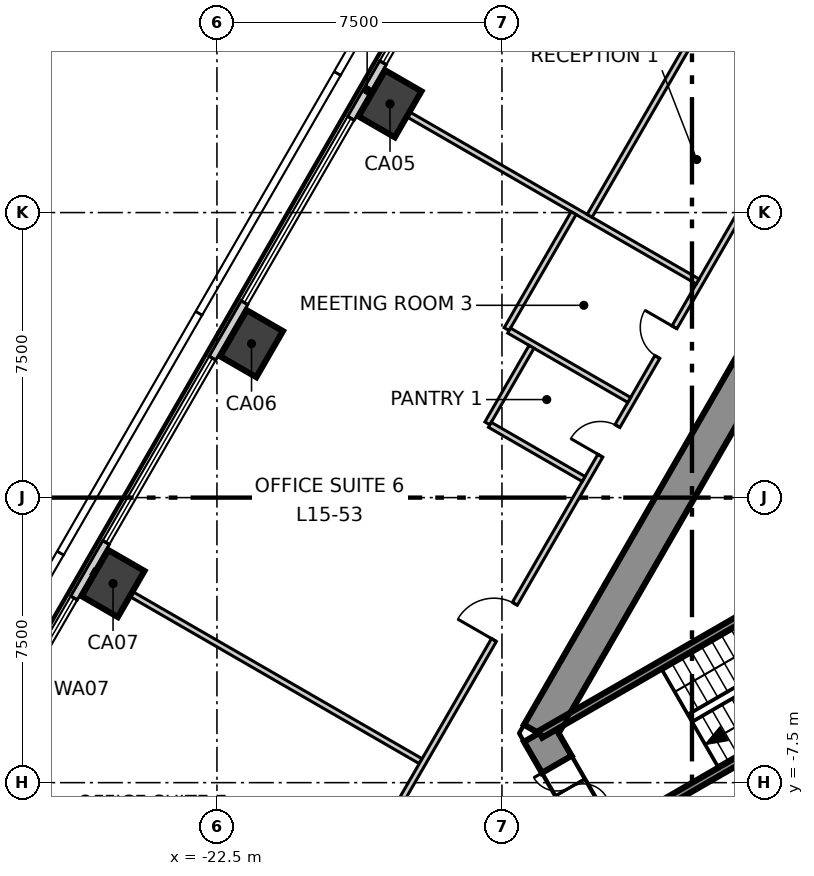
"""IFC4 building model, lengths in metres.
Left out: names, types, materials, properties, quantities, classifications, styles, units other than length and angle.
Written with IfcOpenShell. Run it as: python <this file> out.ifc"""

import sys

from ifc_helpers import new_model, si_unit, direction, frame, frame_2d, origin, origin_2d, place, context, subcontext, project, spatial, polyline, rectangle, outline, extrude, element, fill, save


model = new_model("IFC4")
c1 = context("Model", 3, precision=1e-05, world=origin(), true_north=direction((0.0, 1.0)))
c2 = subcontext(c1, "Body", "Model", "MODEL_VIEW")
j1 = project(units=[si_unit("LENGTHUNIT", "METRE"), si_unit("PLANEANGLEUNIT", "RADIAN")], contexts=[c1])
p1 = place(None, origin())
s1 = spatial("IfcSite", under=j1, at=p1, CompositionType="ELEMENT")
p2 = place(p1, origin())
s2 = spatial("IfcBuilding", under=s1, at=p2, CompositionType="ELEMENT")
p3 = place(p2, frame((0.0, 0.0, 71.3)))
s3 = spatial("IfcBuildingStorey", under=s2, at=p3, CompositionType="ELEMENT", Elevation=71.3)
p4 = place(p3, frame((-1.645, 15.25, -0.3), z_axis=(0.0, 0.0, 1.0), x_axis=(-0.500026485275, -0.866010111964, 0.0)))
e1 = element("IfcWall", 1, at=p4, inside=s3, PredefinedType="SHEAR", context=c2, shape_type="SweptSolid", body=[
    extrude(outline(polyline([(-0.26, -0.45), (1.685, -0.45), (3.63, -0.45), (5.576, -0.45), (7.521, -0.45), (9.466, -0.449), (11.411, -0.449), (13.357, -0.449), (15.302, -0.449), (17.247, -0.449), (19.192, -0.449), (21.138, -0.449), (23.083, -0.449), (25.028, -0.449), (24.509, 0.45), (22.644, 0.45), (20.778, 0.45), (18.913, 0.45), (17.048, 0.45), (15.182, 0.449), (13.317, 0.449), (11.452, 0.449), (9.587, 0.449), (7.721, 0.449), (5.856, 0.449), (3.991, 0.449), (2.125, 0.449), (0.26, 0.449), (-0.26, -0.45)])), origin(), (0.0, 0.0, 1.0), 4.0),
])
p5 = place(p4, frame((11.834, 0.0, 0.3)))
e2 = element("IfcOpeningElement", 2, at=p5, cuts=e1, PredefinedType="OPENING", context=c2, shape_type="SweptSolid", body=[
    extrude(rectangle(XDim=1.1, YDim=2.1, at=frame_2d((0.55, 1.05))), frame((0.0, 0.46, 0.0), z_axis=(0.0, -1.0, 0.0), x_axis=(1.0, 0.0, 0.0)), (0.0, 0.0, 1.0), 0.92),
])
p6 = place(p4, frame((8.13, 0.0, 0.3)))
e3 = element("IfcOpeningElement", 3, at=p6, cuts=e1, PredefinedType="OPENING", context=c2, shape_type="SweptSolid", body=[
    extrude(rectangle(XDim=0.9, YDim=2.1, at=frame_2d((0.45, 1.05))), frame((0.0, 0.46, 0.0), z_axis=(0.0, -1.0, 0.0), x_axis=(1.0, 0.0, 0.0)), (0.0, 0.0, 1.0), 0.92),
])
p7 = place(p4, frame((3.255, 0.0, 0.3)))
e4 = element("IfcOpeningElement", 4, at=p7, cuts=e1, PredefinedType="OPENING", context=c2, shape_type="SweptSolid", body=[
    extrude(rectangle(XDim=0.9, YDim=2.1, at=frame_2d((0.45, 1.05))), frame((0.0, 0.46, 0.0), z_axis=(0.0, -1.0, 0.0), x_axis=(1.0, 0.0, 0.0)), (0.0, 0.0, 1.0), 0.92),
])
p8 = place(p3, frame((-14.03, -6.2, -0.3), z_axis=(0.0, 0.0, 1.0), x_axis=(0.500111984565, -0.865960739811, 0.0)))
e5 = element("IfcWall", 5, at=p8, inside=s3, PredefinedType="SHEAR", context=c2, shape_type="SweptSolid", body=[
    extrude(outline(polyline([(-0.26, -0.449), (1.646, -0.449), (3.551, -0.45), (3.032, 0.45), (1.646, 0.45), (0.26, 0.45), (-0.26, -0.449)])), origin(), (0.0, 0.0, 1.0), 4.0),
])
p9 = place(p8, frame((0.946, 0.0, 0.3)))
e6 = element("IfcOpeningElement", 6, at=p9, cuts=e5, PredefinedType="OPENING", context=c2, shape_type="SweptSolid", body=[
    extrude(rectangle(XDim=1.4, YDim=2.1, at=frame_2d((0.7, 1.05))), frame((0.0, 0.46, 0.0), z_axis=(0.0, -1.0, 0.0), x_axis=(1.0, 0.0, 0.0)), (0.0, 0.0, 1.0), 0.92),
])
for number, where, z_axis, x_axis in (
    (7, (-17.946, 10.361, -0.3), (0.0, 0.0, 1.0), (0.5, 0.866, 0.0)),
    (8, (-21.59, 4.05, -0.3), (0.0, 0.0, 1.0), (0.5, 0.866, 0.0)),
    (9, (-25.234, -2.261, -0.3), (0.0, 0.0, 1.0), (0.5, 0.866, 0.0)),
):
    element("IfcColumn", number, at=place(p3, frame(where, z_axis=z_axis, x_axis=x_axis)), inside=s3, PredefinedType="COLUMN", context=c2, shape_type="SweptSolid", body=[
        extrude(rectangle(XDim=1.4, YDim=1.1, at=origin_2d()), origin(), (0.0, 0.0, 1.0), 4.0),
    ])
p10 = place(p3, frame((-3.326, 37.084, 0.0), z_axis=(0.0, 0.0, 1.0), x_axis=(-0.500000131003, -0.86602532815, 0.0)))
e10 = element("IfcWall", 10, at=p10, inside=s3, PredefinedType="ELEMENTEDWALL", context=c2, shape_type="SweptSolid", body=[
    extrude(rectangle(XDim=60.886, YDim=0.2, at=frame_2d((30.443, 0.0))), origin(), (0.0, 0.0, 1.0), 3.7),
])
p11 = place(p10, frame((2.146, 0.0, 0.9)))
e11 = element("IfcOpeningElement", 11, at=p11, cuts=e10, PredefinedType="OPENING", context=c2, shape_type="SweptSolid", body=[
    extrude(rectangle(XDim=5.6, YDim=2.5, at=frame_2d((2.8, 1.25))), frame((0.0, 0.11, 0.0), z_axis=(0.0, -1.0, 0.0), x_axis=(1.0, 0.0, 0.0)), (0.0, 0.0, 1.0), 0.22),
])
p12 = place(p10, frame((9.434, 0.0, 0.9)))
e12 = element("IfcOpeningElement", 12, at=p12, cuts=e10, PredefinedType="OPENING", context=c2, shape_type="SweptSolid", body=[
    extrude(rectangle(XDim=5.6, YDim=2.5, at=frame_2d((2.8, 1.25))), frame((0.0, 0.11, 0.0), z_axis=(0.0, -1.0, 0.0), x_axis=(1.0, 0.0, 0.0)), (0.0, 0.0, 1.0), 0.22),
])
p13 = place(p10, frame((16.721, 0.0, 0.9)))
e13 = element("IfcOpeningElement", 13, at=p13, cuts=e10, PredefinedType="OPENING", context=c2, shape_type="SweptSolid", body=[
    extrude(rectangle(XDim=5.6, YDim=2.5, at=frame_2d((2.8, 1.25))), frame((0.0, 0.11, 0.0), z_axis=(0.0, -1.0, 0.0), x_axis=(1.0, 0.0, 0.0)), (0.0, 0.0, 1.0), 0.22),
])
p14 = place(p10, frame((24.009, 0.0, 0.9)))
e14 = element("IfcOpeningElement", 14, at=p14, cuts=e10, PredefinedType="OPENING", context=c2, shape_type="SweptSolid", body=[
    extrude(rectangle(XDim=5.6, YDim=2.5, at=frame_2d((2.8, 1.25))), frame((0.0, 0.11, 0.0), z_axis=(0.0, -1.0, 0.0), x_axis=(1.0, 0.0, 0.0)), (0.0, 0.0, 1.0), 0.22),
])
p15 = place(p10, frame((31.297, 0.0, 0.9)))
e15 = element("IfcOpeningElement", 15, at=p15, cuts=e10, PredefinedType="OPENING", context=c2, shape_type="SweptSolid", body=[
    extrude(rectangle(XDim=5.6, YDim=2.5, at=frame_2d((2.8, 1.25))), frame((0.0, 0.11, 0.0), z_axis=(0.0, -1.0, 0.0), x_axis=(1.0, 0.0, 0.0)), (0.0, 0.0, 1.0), 0.22),
])
p16 = place(p10, frame((38.584, 0.0, 0.9)))
e16 = element("IfcOpeningElement", 16, at=p16, cuts=e10, PredefinedType="OPENING", context=c2, shape_type="SweptSolid", body=[
    extrude(rectangle(XDim=5.6, YDim=2.5, at=frame_2d((2.8, 1.25))), frame((0.0, 0.11, 0.0), z_axis=(0.0, -1.0, 0.0), x_axis=(1.0, 0.0, 0.0)), (0.0, 0.0, 1.0), 0.22),
])
p17 = place(p10, frame((45.872, 0.0, 0.9)))
e17 = element("IfcOpeningElement", 17, at=p17, cuts=e10, PredefinedType="OPENING", context=c2, shape_type="SweptSolid", body=[
    extrude(rectangle(XDim=5.6, YDim=2.5, at=frame_2d((2.8, 1.25))), frame((0.0, 0.11, 0.0), z_axis=(0.0, -1.0, 0.0), x_axis=(1.0, 0.0, 0.0)), (0.0, 0.0, 1.0), 0.22),
])
p18 = place(p10, frame((53.159, 0.0, 0.9)))
e18 = element("IfcOpeningElement", 18, at=p18, cuts=e10, PredefinedType="OPENING", context=c2, shape_type="SweptSolid", body=[
    extrude(rectangle(XDim=5.6, YDim=2.5, at=frame_2d((2.8, 1.25))), frame((0.0, 0.11, 0.0), z_axis=(0.0, -1.0, 0.0), x_axis=(1.0, 0.0, 0.0)), (0.0, 0.0, 1.0), 0.22),
])
p19 = place(p3, frame((-25.771, -1.951, 0.0), z_axis=(0.0, 0.0, 1.0), x_axis=(0.866008152443, -0.500029879009, 0.0)))
e19 = element("IfcWall", 19, at=p19, inside=s3, PredefinedType="PARTITIONING", context=c2, shape_type="SweptSolid", body=[
    extrude(rectangle(XDim=9.968, YDim=0.15, at=frame_2d((4.984, 0.0))), origin(), (0.0, 0.0, 1.0), 3.7),
])
p20 = place(p3, frame((-19.497, -11.17, 0.0), z_axis=(0.0, 0.0, 1.0), x_axis=(0.499998854553, 0.866026065108, 0.0)))
e20 = element("IfcWall", 20, at=p20, inside=s3, PredefinedType="PARTITIONING", context=c2, shape_type="SweptSolid", body=[
    extrude(rectangle(XDim=38.994, YDim=0.15, at=frame_2d((19.497, 0.0))), origin(), (0.0, 0.0, 1.0), 3.7),
])
p21 = place(p20, frame((35.944, 0.0, 0.0)))
e21 = element("IfcOpeningElement", 21, at=p21, cuts=e20, PredefinedType="OPENING", context=c2, shape_type="SweptSolid", body=[
    extrude(rectangle(XDim=1.1, YDim=2.1, at=frame_2d((0.55, 1.05))), frame((0.0, 0.085, 0.0), z_axis=(0.0, -1.0, 0.0), x_axis=(1.0, 0.0, 0.0)), (0.0, 0.0, 1.0), 0.17),
])
p22 = place(p20, frame((26.148, 0.0, 0.0)))
e22 = element("IfcOpeningElement", 22, at=p22, cuts=e20, PredefinedType="OPENING", context=c2, shape_type="SweptSolid", body=[
    extrude(rectangle(XDim=1.1, YDim=2.1, at=frame_2d((0.55, 1.05))), frame((0.0, 0.085, 0.0), z_axis=(0.0, -1.0, 0.0), x_axis=(1.0, 0.0, 0.0)), (0.0, 0.0, 1.0), 0.17),
])
p23 = place(p20, frame((8.572, 0.0, 0.0)))
e23 = element("IfcOpeningElement", 23, at=p23, cuts=e20, PredefinedType="OPENING", context=c2, shape_type="SweptSolid", body=[
    extrude(rectangle(XDim=1.1, YDim=2.1, at=frame_2d((0.55, 1.05))), frame((0.0, 0.085, 0.0), z_axis=(0.0, -1.0, 0.0), x_axis=(1.0, 0.0, 0.0)), (0.0, 0.0, 1.0), 0.17),
])
p24 = place(p20, frame((17.172, 0.0, 0.0)))
e24 = element("IfcOpeningElement", 24, at=p24, cuts=e20, PredefinedType="OPENING", context=c2, shape_type="SweptSolid", body=[
    extrude(rectangle(XDim=0.9, YDim=2.1, at=frame_2d((0.45, 1.05))), frame((0.0, 0.085, 0.0), z_axis=(0.0, -1.0, 0.0), x_axis=(1.0, 0.0, 0.0)), (0.0, 0.0, 1.0), 0.17),
])
p25 = place(p20, frame((14.172, 0.0, 0.0)))
e25 = element("IfcOpeningElement", 25, at=p25, cuts=e20, PredefinedType="OPENING", context=c2, shape_type="SweptSolid", body=[
    extrude(rectangle(XDim=0.9, YDim=2.1, at=frame_2d((0.45, 1.05))), frame((0.0, 0.085, 0.0), z_axis=(0.0, -1.0, 0.0), x_axis=(1.0, 0.0, 0.0)), (0.0, 0.0, 1.0), 0.17),
])
p26 = place(p20, frame((1.797, 0.0, 0.0)))
e26 = element("IfcOpeningElement", 26, at=p26, cuts=e20, PredefinedType="OPENING", context=c2, shape_type="SweptSolid", body=[
    extrude(rectangle(XDim=1.1, YDim=2.1, at=frame_2d((0.55, 1.05))), frame((0.0, 0.085, 0.0), z_axis=(0.0, -1.0, 0.0), x_axis=(1.0, 0.0, 0.0)), (0.0, 0.0, 1.0), 0.17),
])
p27 = place(p3, frame((-18.483, 10.671, 0.0), z_axis=(0.0, 0.0, 1.0), x_axis=(0.866012634826, -0.500022115832, 0.0)))
e27 = element("IfcWall", 27, at=p27, inside=s3, PredefinedType="PARTITIONING", context=c2, shape_type="SweptSolid", body=[
    extrude(rectangle(XDim=9.967, YDim=0.15, at=frame_2d((4.984, 0.0))), origin(), (0.0, 0.0, 1.0), 3.2),
])
p28 = place(p3, frame((-14.877, 4.432, 0.0), z_axis=(0.0, 0.0, 1.0), x_axis=(0.499826373536, 0.866125623866, 0.0)))
e28 = element("IfcWall", 28, at=p28, inside=s3, PredefinedType="PARTITIONING", context=c2, shape_type="SweptSolid", body=[
    extrude(rectangle(XDim=3.525, YDim=0.15, at=frame_2d((1.763, 0.0))), origin(), (0.0, 0.0, 1.0), 3.7),
])
p29 = place(p3, frame((-14.812, 4.395, 0.0), z_axis=(0.0, 0.0, 1.0), x_axis=(0.866040790738, -0.499973348067, 0.0)))
e29 = element("IfcWall", 29, at=p29, inside=s3, PredefinedType="PARTITIONING", context=c2, shape_type="SweptSolid", body=[
    extrude(rectangle(XDim=3.65, YDim=0.15, at=frame_2d((1.825, 0.0))), origin(), (0.0, 0.0, 1.0), 3.7),
])
p30 = place(p3, frame((-15.384, 1.954, 0.0), z_axis=(0.0, 0.0, 1.0), x_axis=(0.499980071345, 0.866036909293, 0.0)))
e30 = element("IfcWall", 30, at=p30, inside=s3, PredefinedType="PARTITIONING", context=c2, shape_type="SweptSolid", body=[
    extrude(rectangle(XDim=2.324, YDim=0.15, at=frame_2d((1.162, 0.0))), origin(), (0.0, 0.0, 1.0), 3.7),
])
p31 = place(p3, frame((-15.319, 1.916, 0.0), z_axis=(0.0, 0.0, 1.0), x_axis=(0.866004402611, -0.500036373335, 0.0)))
e31 = element("IfcWall", 31, at=p31, inside=s3, PredefinedType="PARTITIONING", context=c2, shape_type="SweptSolid", body=[
    extrude(rectangle(XDim=2.85, YDim=0.15, at=frame_2d((1.425, 0.0))), origin(), (0.0, 0.0, 1.0), 3.7),
])
p32 = place(p3, frame((-12.693, 7.415, 0.0), z_axis=(0.0, 0.0, 1.0), x_axis=(0.500017889033, 0.8660150753, 0.0)))
e32 = element("IfcWall", 32, at=p32, inside=s3, PredefinedType="PARTITIONING", context=c2, shape_type="SweptSolid", body=[
    extrude(rectangle(XDim=14.426, YDim=0.15, at=frame_2d((7.213, 0.0))), origin(), (0.0, 0.0, 1.0), 3.7),
])
p33 = place(p32, frame((6.751, 0.0, 0.0)))
e33 = element("IfcOpeningElement", 33, at=p33, cuts=e32, PredefinedType="OPENING", context=c2, shape_type="SweptSolid", body=[
    extrude(rectangle(XDim=1.0, YDim=2.1, at=frame_2d((0.5, 1.05))), frame((0.0, 0.085, 0.0), z_axis=(0.0, -1.0, 0.0), x_axis=(1.0, 0.0, 0.0)), (0.0, 0.0, 1.0), 0.17),
])
p34 = place(p3, frame((-13.99, -6.229, 0.0), z_axis=(0.0, 0.0, 1.0), x_axis=(0.866060059011, 0.499939970583, 0.0)))
e34 = element("IfcWall", 34, at=p34, inside=s3, PredefinedType="SOLIDWALL", context=c2, shape_type="SweptSolid", body=[
    extrude(rectangle(XDim=8.615, YDim=0.2, at=frame_2d((4.307, 0.0))), origin(), (0.0, 0.0, 1.0), 3.7),
])
p35 = place(p3, frame((-12.39, -9.001, 0.0), z_axis=(0.0, 0.0, 1.0), x_axis=(0.866010975815, 0.500024989144, 0.0)))
e35 = element("IfcWall", 35, at=p35, inside=s3, PredefinedType="SOLIDWALL", context=c2, shape_type="SweptSolid", body=[
    extrude(rectangle(XDim=8.615, YDim=0.2, at=frame_2d((4.308, 0.0))), origin(), (0.0, 0.0, 1.0), 3.7),
])
p36 = place(p14, origin())
e36 = element("IfcWindow", 36, at=p36, inside=s3, PartitioningType="SINGLE_PANEL", PredefinedType="WINDOW", context=c2, shape_type="SweptSolid", body=[
    extrude(rectangle(XDim=5.6, YDim=2.5, at=frame_2d((2.8, 1.25))), frame((0.0, 0.03, 0.0), z_axis=(0.0, -1.0, 0.0), x_axis=(1.0, 0.0, 0.0)), (0.0, 0.0, 1.0), 0.06),
])
fill(e14, e36)
p37 = place(p15, origin())
e37 = element("IfcWindow", 37, at=p37, inside=s3, PartitioningType="SINGLE_PANEL", PredefinedType="WINDOW", context=c2, shape_type="SweptSolid", body=[
    extrude(rectangle(XDim=5.6, YDim=2.5, at=frame_2d((2.8, 1.25))), frame((0.0, 0.03, 0.0), z_axis=(0.0, -1.0, 0.0), x_axis=(1.0, 0.0, 0.0)), (0.0, 0.0, 1.0), 0.06),
])
fill(e15, e37)
p38 = place(p16, origin())
e38 = element("IfcWindow", 38, at=p38, inside=s3, PartitioningType="SINGLE_PANEL", PredefinedType="WINDOW", context=c2, shape_type="SweptSolid", body=[
    extrude(rectangle(XDim=5.6, YDim=2.5, at=frame_2d((2.8, 1.25))), frame((0.0, 0.03, 0.0), z_axis=(0.0, -1.0, 0.0), x_axis=(1.0, 0.0, 0.0)), (0.0, 0.0, 1.0), 0.06),
])
fill(e16, e38)
p39 = place(p17, origin())
e39 = element("IfcWindow", 39, at=p39, inside=s3, PartitioningType="SINGLE_PANEL", PredefinedType="WINDOW", context=c2, shape_type="SweptSolid", body=[
    extrude(rectangle(XDim=5.6, YDim=2.5, at=frame_2d((2.8, 1.25))), frame((0.0, 0.03, 0.0), z_axis=(0.0, -1.0, 0.0), x_axis=(1.0, 0.0, 0.0)), (0.0, 0.0, 1.0), 0.06),
])
fill(e17, e39)
p40 = place(p23, origin())
e40 = element("IfcDoor", 40, at=p40, inside=s3, OperationType="SINGLE_SWING_RIGHT", PredefinedType="DOOR", context=c2, shape_type="SweptSolid", body=[
    extrude(rectangle(XDim=1.1, YDim=2.1, at=frame_2d((0.55, 1.05))), frame((0.0, 0.025, 0.0), z_axis=(0.0, -1.0, 0.0), x_axis=(1.0, 0.0, 0.0)), (0.0, 0.0, 1.0), 0.05),
])
fill(e23, e40)
p41 = place(p24, origin())
e41 = element("IfcDoor", 41, at=p41, inside=s3, OperationType="SINGLE_SWING_LEFT", PredefinedType="DOOR", context=c2, shape_type="SweptSolid", body=[
    extrude(rectangle(XDim=0.9, YDim=2.1, at=frame_2d((0.45, 1.05))), frame((0.0, 0.025, 0.0), z_axis=(0.0, -1.0, 0.0), x_axis=(1.0, 0.0, 0.0)), (0.0, 0.0, 1.0), 0.05),
])
fill(e24, e41)
p42 = place(p25, origin())
e42 = element("IfcDoor", 42, at=p42, inside=s3, OperationType="SINGLE_SWING_RIGHT", PredefinedType="DOOR", context=c2, shape_type="SweptSolid", body=[
    extrude(rectangle(XDim=0.9, YDim=2.1, at=frame_2d((0.45, 1.05))), frame((0.0, 0.025, 0.0), z_axis=(0.0, -1.0, 0.0), x_axis=(1.0, 0.0, 0.0)), (0.0, 0.0, 1.0), 0.05),
])
fill(e25, e42)
p43 = place(p9, origin())
e43 = element("IfcDoor", 43, at=p43, inside=s3, OperationType="DOUBLE_DOOR_SINGLE_SWING", PredefinedType="DOOR", context=c2, shape_type="SweptSolid", body=[
    extrude(rectangle(XDim=1.4, YDim=2.1, at=frame_2d((0.7, 1.05))), frame((0.0, 0.025, 0.0), z_axis=(0.0, -1.0, 0.0), x_axis=(1.0, 0.0, 0.0)), (0.0, 0.0, 1.0), 0.05),
])
fill(e6, e43)
save(model, sys.argv[1])
